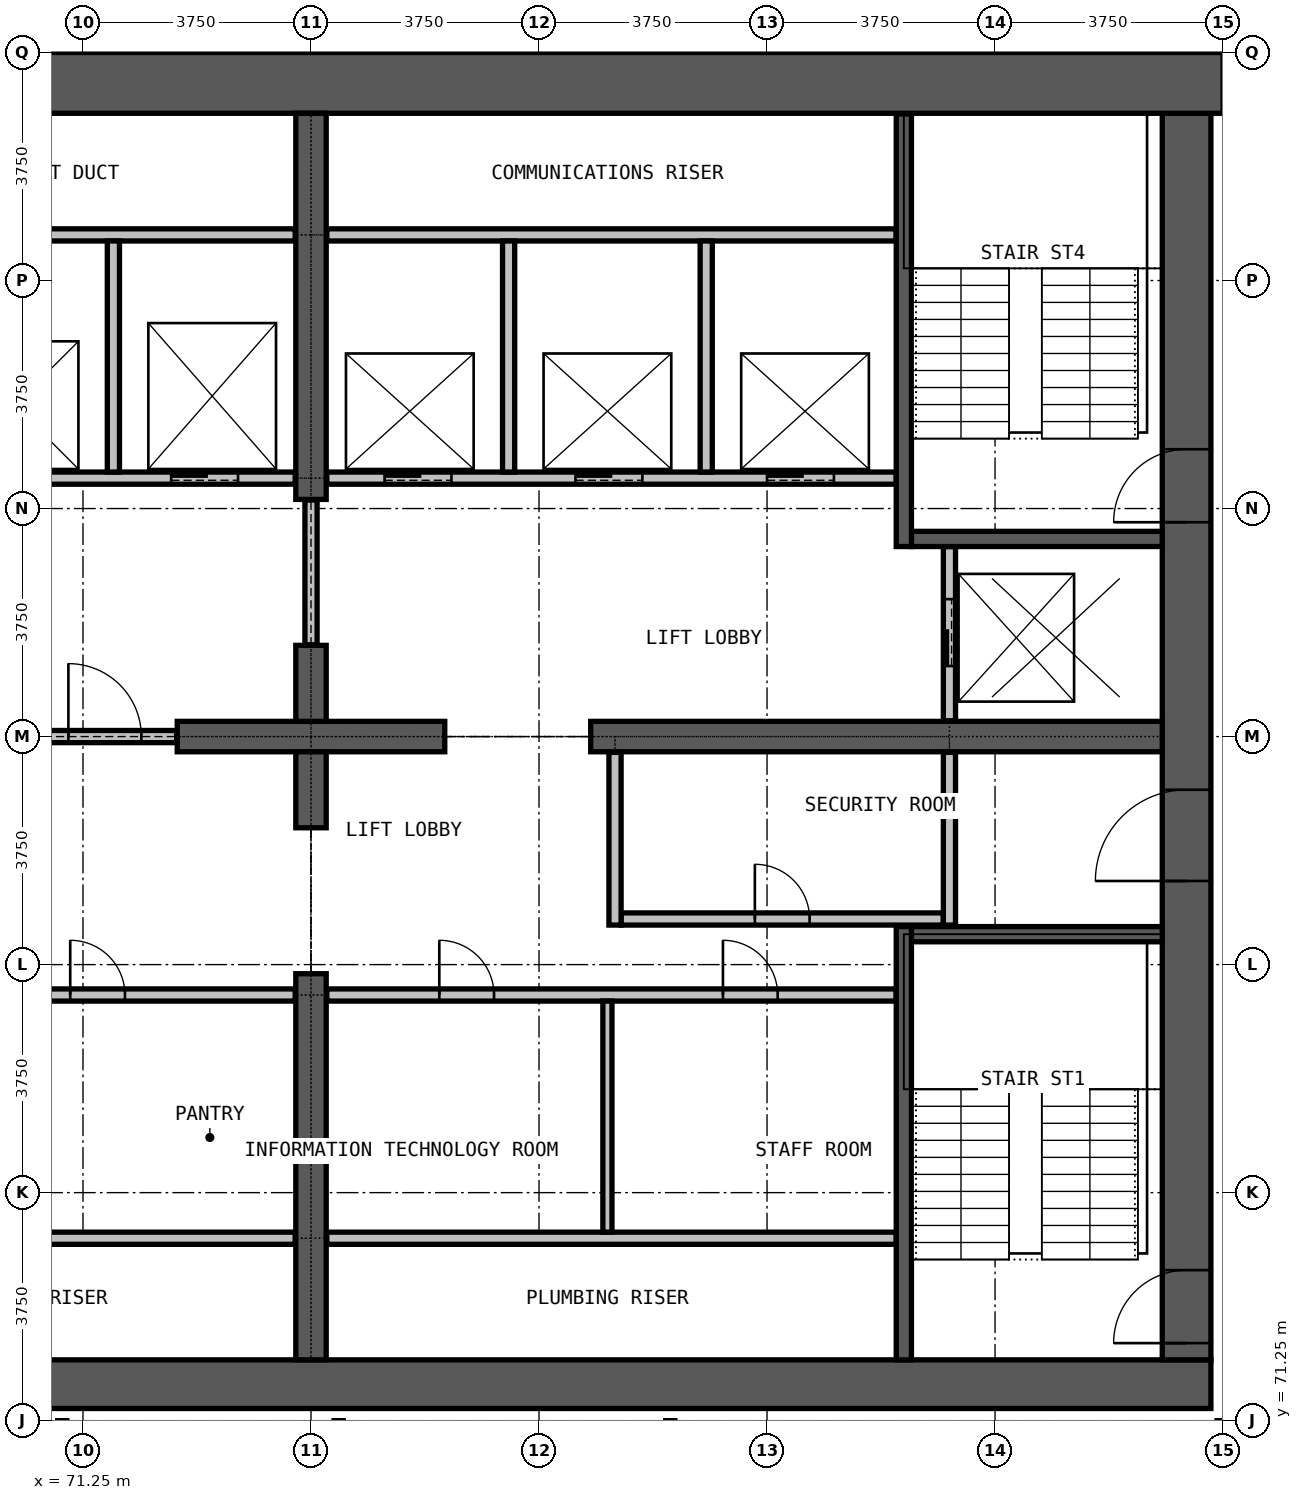
"""IFC4 building model, lengths in metres.
Left out: names, types, materials, properties, quantities, classifications, styles, units other than length and angle.
Written with IfcOpenShell. Run it as: python <this file> out.ifc"""

import sys

from ifc_helpers import new_model, si_unit, direction, frame, frame_2d, origin, place, context, subcontext, project, spatial, rectangle, extrude, element, fill, save


model = new_model("IFC4")
c1 = context("Model", 3, precision=1e-05, world=origin(), true_north=direction((0.0, 1.0)))
c2 = subcontext(c1, "Body", "Model", "MODEL_VIEW")
j1 = project(units=[si_unit("LENGTHUNIT", "METRE"), si_unit("PLANEANGLEUNIT", "RADIAN")], contexts=[c1])
p1 = place(None, origin())
s1 = spatial("IfcSite", under=j1, at=p1, CompositionType="ELEMENT")
p2 = place(p1, origin())
s2 = spatial("IfcBuilding", under=s1, at=p2, CompositionType="ELEMENT")
p3 = place(p2, frame((0.0, 0.0, 176.5)))
s3 = spatial("IfcBuildingStorey", under=s2, at=p3, CompositionType="ELEMENT", Elevation=176.5)
p4 = place(p3, frame((60.2, 71.85, 0.0), z_axis=(0.0, 0.0, 1.0), x_axis=(1.0, 0.0, 0.0)))
e1 = element("IfcWall", 1, at=p4, inside=s3, PredefinedType="SHEAR", context=c2, shape_type="SweptSolid", body=[
    extrude(rectangle(XDim=29.6, YDim=0.8, at=frame_2d((14.8, 0.0))), origin(), (0.0, 0.0, 1.0), 3.6),
])
p5 = place(p3, frame((89.4, 72.25, 0.0), z_axis=(0.0, 0.0, 1.0), x_axis=(0.0, 1.0, 0.0)))
e2 = element("IfcWall", 2, at=p5, inside=s3, PredefinedType="SHEAR", context=c2, shape_type="SweptSolid", body=[
    extrude(rectangle(XDim=20.5, YDim=0.8, at=frame_2d((10.25, 0.0))), origin(), (0.0, 0.0, 1.0), 3.6),
])
p6 = place(p5, frame((0.275, 0.0, 0.0)))
e3 = element("IfcOpeningElement", 3, at=p6, cuts=e2, PredefinedType="OPENING", context=c2, shape_type="SweptSolid", body=[
    extrude(rectangle(XDim=1.2, YDim=2.2, at=frame_2d((0.6, 1.1))), frame((0.0, 0.41, 0.0), z_axis=(0.0, -1.0, 0.0), x_axis=(1.0, 0.0, 0.0)), (0.0, 0.0, 1.0), 0.82),
])
p7 = place(p5, frame((13.775, 0.0, 0.0)))
e4 = element("IfcOpeningElement", 4, at=p7, cuts=e2, PredefinedType="OPENING", context=c2, shape_type="SweptSolid", body=[
    extrude(rectangle(XDim=1.2, YDim=2.2, at=frame_2d((0.6, 1.1))), frame((0.0, 0.41, 0.0), z_axis=(0.0, -1.0, 0.0), x_axis=(1.0, 0.0, 0.0)), (0.0, 0.0, 1.0), 0.82),
])
p8 = place(p5, frame((7.875, 0.0, 0.0)))
e5 = element("IfcOpeningElement", 5, at=p8, cuts=e2, PredefinedType="OPENING", context=c2, shape_type="SweptSolid", body=[
    extrude(rectangle(XDim=1.5, YDim=2.2, at=frame_2d((0.75, 1.1))), frame((0.0, 0.41, 0.0), z_axis=(0.0, -1.0, 0.0), x_axis=(1.0, 0.0, 0.0)), (0.0, 0.0, 1.0), 0.82),
])
p9 = place(p3, frame((90.0, 93.25, 0.0), z_axis=(0.0, 0.0, 1.0), x_axis=(-1.0, 0.0, 0.0)))
e6 = element("IfcWall", 6, at=p9, inside=s3, PredefinedType="SHEAR", context=c2, shape_type="SweptSolid", body=[
    extrude(rectangle(XDim=30.0, YDim=1.0, at=frame_2d((15.0, 0.0))), origin(), (0.0, 0.0, 1.0), 3.6),
])
p10 = place(p3, frame((72.8, 82.5, 0.0), z_axis=(0.0, 0.0, 1.0), x_axis=(1.0, 0.0, 0.0)))
e7 = element("IfcWall", 7, at=p10, inside=s3, PredefinedType="SHEAR", context=c2, shape_type="SweptSolid", body=[
    extrude(rectangle(XDim=4.4, YDim=0.5, at=frame_2d((2.2, 0.0))), origin(), (0.0, 0.0, 1.0), 3.6),
])
p11 = place(p3, frame((79.6, 82.5, 0.0), z_axis=(0.0, 0.0, 1.0), x_axis=(1.0, 0.0, 0.0)))
e8 = element("IfcWall", 8, at=p11, inside=s3, PredefinedType="SHEAR", context=c2, shape_type="SweptSolid", body=[
    extrude(rectangle(XDim=9.4, YDim=0.5, at=frame_2d((4.7, 0.0))), origin(), (0.0, 0.0, 1.0), 3.6),
])
p12 = place(p3, frame((75.0, 72.25, 0.0), z_axis=(0.0, 0.0, 1.0), x_axis=(0.0, 1.0, 0.0)))
e9 = element("IfcWall", 9, at=p12, inside=s3, PredefinedType="SHEAR", context=c2, shape_type="SweptSolid", body=[
    extrude(rectangle(XDim=6.35, YDim=0.5, at=frame_2d((3.175, 0.0))), origin(), (0.0, 0.0, 1.0), 3.6),
])
for number, where, z_axis, x_axis in (
    (10, (75.0, 81.0, 0.0), (0.0, 0.0, 1.0), (0.0, 1.0, 0.0)),
    (11, (75.0, 82.75, 0.0), (0.0, 0.0, 1.0), (0.0, 1.0, 0.0)),
):
    element("IfcWall", number, at=place(p3, frame(where, z_axis=z_axis, x_axis=x_axis)), inside=s3, PredefinedType="SHEAR", context=c2, shape_type="SweptSolid", body=[
        extrude(rectangle(XDim=1.25, YDim=0.5, at=frame_2d((0.625, 0.0))), origin(), (0.0, 0.0, 1.0), 3.6),
    ])
p13 = place(p3, frame((75.0, 86.4, 0.0), z_axis=(0.0, 0.0, 1.0), x_axis=(0.0, 1.0, 0.0)))
e12 = element("IfcWall", 12, at=p13, inside=s3, PredefinedType="SHEAR", context=c2, shape_type="SweptSolid", body=[
    extrude(rectangle(XDim=6.35, YDim=0.5, at=frame_2d((3.175, 0.0))), origin(), (0.0, 0.0, 1.0), 3.6),
])
for number, where, z_axis, x_axis in (
    (13, (65.375, 74.25, 0.0), (0.0, 0.0, 1.0), (1.0, 0.0, 0.0)),
    (14, (75.26, 74.25, 0.0), (0.0, 0.0, 1.0), (1.0, 0.0, 0.0)),
):
    element("IfcWall", number, at=place(p3, frame(where, z_axis=z_axis, x_axis=x_axis)), inside=s3, PredefinedType="PARTITIONING", context=c2, shape_type="SweptSolid", body=[
        extrude(rectangle(XDim=9.365, YDim=0.2, at=frame_2d((4.683, 0.0))), origin(), (0.0, 0.0, 1.0), 3.3),
    ])
p14 = place(p3, frame((65.375, 78.25, 0.0), z_axis=(0.0, 0.0, 1.0), x_axis=(1.0, 0.0, 0.0)))
e15 = element("IfcWall", 15, at=p14, inside=s3, PredefinedType="PARTITIONING", context=c2, shape_type="SweptSolid", body=[
    extrude(rectangle(XDim=9.365, YDim=0.2, at=frame_2d((4.683, 0.0))), origin(), (0.0, 0.0, 1.0), 3.3),
])
p15 = place(p14, frame((1.0, 0.0, 0.0)))
e16 = element("IfcOpeningElement", 16, at=p15, cuts=e15, PredefinedType="OPENING", context=c2, shape_type="SweptSolid", body=[
    extrude(rectangle(XDim=0.9, YDim=2.2, at=frame_2d((0.45, 1.1))), frame((0.0, 0.11, 0.0), z_axis=(0.0, -1.0, 0.0), x_axis=(1.0, 0.0, 0.0)), (0.0, 0.0, 1.0), 0.22),
])
p16 = place(p14, frame((5.665, 0.0, 0.0)))
e17 = element("IfcOpeningElement", 17, at=p16, cuts=e15, PredefinedType="OPENING", context=c2, shape_type="SweptSolid", body=[
    extrude(rectangle(XDim=0.9, YDim=2.2, at=frame_2d((0.45, 1.1))), frame((0.0, 0.11, 0.0), z_axis=(0.0, -1.0, 0.0), x_axis=(1.0, 0.0, 0.0)), (0.0, 0.0, 1.0), 0.22),
])
p17 = place(p3, frame((75.26, 78.25, 0.0), z_axis=(0.0, 0.0, 1.0), x_axis=(1.0, 0.0, 0.0)))
e18 = element("IfcWall", 18, at=p17, inside=s3, PredefinedType="PARTITIONING", context=c2, shape_type="SweptSolid", body=[
    extrude(rectangle(XDim=9.365, YDim=0.2, at=frame_2d((4.683, 0.0))), origin(), (0.0, 0.0, 1.0), 3.3),
])
p18 = place(p17, frame((1.85, 0.0, 0.0)))
e19 = element("IfcOpeningElement", 19, at=p18, cuts=e18, PredefinedType="OPENING", context=c2, shape_type="SweptSolid", body=[
    extrude(rectangle(XDim=0.9, YDim=2.2, at=frame_2d((0.45, 1.1))), frame((0.0, 0.11, 0.0), z_axis=(0.0, -1.0, 0.0), x_axis=(1.0, 0.0, 0.0)), (0.0, 0.0, 1.0), 0.22),
])
p19 = place(p17, frame((6.515, 0.0, 0.0)))
e20 = element("IfcOpeningElement", 20, at=p19, cuts=e18, PredefinedType="OPENING", context=c2, shape_type="SweptSolid", body=[
    extrude(rectangle(XDim=0.9, YDim=2.2, at=frame_2d((0.45, 1.1))), frame((0.0, 0.11, 0.0), z_axis=(0.0, -1.0, 0.0), x_axis=(1.0, 0.0, 0.0)), (0.0, 0.0, 1.0), 0.22),
])
p20 = place(p3, frame((80.1, 79.5, 0.0), z_axis=(0.0, 0.0, 1.0), x_axis=(1.0, 0.0, 0.0)))
e21 = element("IfcWall", 21, at=p20, inside=s3, PredefinedType="PARTITIONING", context=c2, shape_type="SweptSolid", body=[
    extrude(rectangle(XDim=5.3, YDim=0.2, at=frame_2d((2.65, 0.0))), origin(), (0.0, 0.0, 1.0), 3.3),
])
p21 = place(p20, frame((2.2, 0.0, 0.0)))
e22 = element("IfcOpeningElement", 22, at=p21, cuts=e21, PredefinedType="OPENING", context=c2, shape_type="SweptSolid", body=[
    extrude(rectangle(XDim=0.9, YDim=2.2, at=frame_2d((0.45, 1.1))), frame((0.0, 0.11, 0.0), z_axis=(0.0, -1.0, 0.0), x_axis=(1.0, 0.0, 0.0)), (0.0, 0.0, 1.0), 0.22),
])
p22 = place(p3, frame((70.41, 82.5, 0.0), z_axis=(0.0, 0.0, 1.0), x_axis=(1.0, 0.0, 0.0)))
e23 = element("IfcWall", 23, at=p22, inside=s3, PredefinedType="PARTITIONING", context=c2, shape_type="SweptSolid", body=[
    extrude(rectangle(XDim=2.38, YDim=0.2, at=frame_2d((1.19, 0.0))), origin(), (0.0, 0.0, 1.0), 2.4),
])
p23 = place(p22, frame((0.6, 0.0, 0.0)))
e24 = element("IfcOpeningElement", 24, at=p23, cuts=e23, PredefinedType="OPENING", context=c2, shape_type="SweptSolid", body=[
    extrude(rectangle(XDim=1.2, YDim=2.2, at=frame_2d((0.6, 1.1))), frame((0.0, 0.11, 0.0), z_axis=(0.0, -1.0, 0.0), x_axis=(1.0, 0.0, 0.0)), (0.0, 0.0, 1.0), 0.22),
])
p24 = place(p3, frame((75.0, 84.01, 0.0), z_axis=(0.0, 0.0, 1.0), x_axis=(0.0, 1.0, 0.0)))
e25 = element("IfcWall", 25, at=p24, inside=s3, PredefinedType="PARTITIONING", context=c2, shape_type="SweptSolid", body=[
    extrude(rectangle(XDim=2.38, YDim=0.2, at=frame_2d((1.19, 0.0))), origin(), (0.0, 0.0, 1.0), 2.4),
])
for number, where, z_axis, x_axis in (
    (26, (80.0, 79.4, 0.0), (0.0, 0.0, 1.0), (0.0, 1.0, 0.0)),
    (27, (85.5, 79.4, 0.0), (0.0, 0.0, 1.0), (0.0, 1.0, 0.0)),
):
    element("IfcWall", number, at=place(p3, frame(where, z_axis=z_axis, x_axis=x_axis)), inside=s3, PredefinedType="PARTITIONING", context=c2, shape_type="SweptSolid", body=[
        extrude(rectangle(XDim=2.84, YDim=0.2, at=frame_2d((1.42, 0.0))), origin(), (0.0, 0.0, 1.0), 3.3),
    ])
p25 = place(p3, frame((79.875, 74.35, 0.0), z_axis=(0.0, 0.0, 1.0), x_axis=(0.0, 1.0, 0.0)))
e28 = element("IfcWall", 28, at=p25, inside=s3, PredefinedType="PARTITIONING", context=c2, shape_type="SweptSolid", body=[
    extrude(rectangle(XDim=3.8, YDim=0.15, at=frame_2d((1.9, 0.0))), origin(), (0.0, 0.0, 1.0), 3.3),
])
p26 = place(p3, frame((65.375, 86.75, 0.0), z_axis=(0.0, 0.0, 1.0), x_axis=(1.0, 0.0, 0.0)))
e29 = element("IfcWall", 29, at=p26, inside=s3, PredefinedType="PARTITIONING", context=c2, shape_type="SweptSolid", body=[
    extrude(rectangle(XDim=9.365, YDim=0.2, at=frame_2d((4.683, 0.0))), origin(), (0.0, 0.0, 1.0), 3.3),
])
p27 = place(p26, frame((1.0, 0.0, 0.0)))
e30 = element("IfcOpeningElement", 30, at=p27, cuts=e29, PredefinedType="OPENING", context=c2, shape_type="SweptSolid", body=[
    extrude(rectangle(XDim=1.1, YDim=2.2, at=frame_2d((0.55, 1.1))), frame((0.0, 0.11, 0.0), z_axis=(0.0, -1.0, 0.0), x_axis=(1.0, 0.0, 0.0)), (0.0, 0.0, 1.0), 0.22),
])
p28 = place(p26, frame((4.175, 0.0, 0.0)))
e31 = element("IfcOpeningElement", 31, at=p28, cuts=e29, PredefinedType="OPENING", context=c2, shape_type="SweptSolid", body=[
    extrude(rectangle(XDim=1.1, YDim=2.2, at=frame_2d((0.55, 1.1))), frame((0.0, 0.11, 0.0), z_axis=(0.0, -1.0, 0.0), x_axis=(1.0, 0.0, 0.0)), (0.0, 0.0, 1.0), 0.22),
])
p29 = place(p26, frame((7.325, 0.0, 0.0)))
e32 = element("IfcOpeningElement", 32, at=p29, cuts=e29, PredefinedType="OPENING", context=c2, shape_type="SweptSolid", body=[
    extrude(rectangle(XDim=1.1, YDim=2.2, at=frame_2d((0.55, 1.1))), frame((0.0, 0.11, 0.0), z_axis=(0.0, -1.0, 0.0), x_axis=(1.0, 0.0, 0.0)), (0.0, 0.0, 1.0), 0.22),
])
p30 = place(p3, frame((75.26, 86.75, 0.0), z_axis=(0.0, 0.0, 1.0), x_axis=(1.0, 0.0, 0.0)))
e33 = element("IfcWall", 33, at=p30, inside=s3, PredefinedType="PARTITIONING", context=c2, shape_type="SweptSolid", body=[
    extrude(rectangle(XDim=9.365, YDim=0.2, at=frame_2d((4.683, 0.0))), origin(), (0.0, 0.0, 1.0), 3.3),
])
p31 = place(p30, frame((0.95, 0.0, 0.0)))
e34 = element("IfcOpeningElement", 34, at=p31, cuts=e33, PredefinedType="OPENING", context=c2, shape_type="SweptSolid", body=[
    extrude(rectangle(XDim=1.1, YDim=2.2, at=frame_2d((0.55, 1.1))), frame((0.0, 0.11, 0.0), z_axis=(0.0, -1.0, 0.0), x_axis=(1.0, 0.0, 0.0)), (0.0, 0.0, 1.0), 0.22),
])
p32 = place(p30, frame((4.09, 0.0, 0.0)))
e35 = element("IfcOpeningElement", 35, at=p32, cuts=e33, PredefinedType="OPENING", context=c2, shape_type="SweptSolid", body=[
    extrude(rectangle(XDim=1.1, YDim=2.2, at=frame_2d((0.55, 1.1))), frame((0.0, 0.11, 0.0), z_axis=(0.0, -1.0, 0.0), x_axis=(1.0, 0.0, 0.0)), (0.0, 0.0, 1.0), 0.22),
])
p33 = place(p30, frame((7.24, 0.0, 0.0)))
e36 = element("IfcOpeningElement", 36, at=p33, cuts=e33, PredefinedType="OPENING", context=c2, shape_type="SweptSolid", body=[
    extrude(rectangle(XDim=1.1, YDim=2.2, at=frame_2d((0.55, 1.1))), frame((0.0, 0.11, 0.0), z_axis=(0.0, -1.0, 0.0), x_axis=(1.0, 0.0, 0.0)), (0.0, 0.0, 1.0), 0.22),
])
for number, where, z_axis, x_axis in (
    (37, (65.375, 90.75, 0.0), (0.0, 0.0, 1.0), (1.0, 0.0, 0.0)),
    (38, (75.26, 90.75, 0.0), (0.0, 0.0, 1.0), (1.0, 0.0, 0.0)),
):
    element("IfcWall", number, at=place(p3, frame(where, z_axis=z_axis, x_axis=x_axis)), inside=s3, PredefinedType="PARTITIONING", context=c2, shape_type="SweptSolid", body=[
        extrude(rectangle(XDim=9.365, YDim=0.2, at=frame_2d((4.683, 0.0))), origin(), (0.0, 0.0, 1.0), 3.3),
    ])
for number, where, z_axis, x_axis in (
    (39, (71.75, 86.85, 0.0), (0.0, 0.0, 1.0), (0.0, 1.0, 0.0)),
    (40, (78.25, 86.85, 0.0), (0.0, 0.0, 1.0), (0.0, 1.0, 0.0)),
    (41, (81.5, 86.85, 0.0), (0.0, 0.0, 1.0), (0.0, 1.0, 0.0)),
):
    element("IfcWall", number, at=place(p3, frame(where, z_axis=z_axis, x_axis=x_axis)), inside=s3, PredefinedType="PARTITIONING", context=c2, shape_type="SweptSolid", body=[
        extrude(rectangle(XDim=3.8, YDim=0.2, at=frame_2d((1.9, 0.0))), origin(), (0.0, 0.0, 1.0), 3.3),
    ])
p34 = place(p3, frame((85.5, 82.76, 0.0), z_axis=(0.0, 0.0, 1.0), x_axis=(0.0, 1.0, 0.0)))
e42 = element("IfcWall", 42, at=p34, inside=s3, PredefinedType="PARTITIONING", context=c2, shape_type="SweptSolid", body=[
    extrude(rectangle(XDim=2.865, YDim=0.2, at=frame_2d((1.433, 0.0))), origin(), (0.0, 0.0, 1.0), 3.3),
])
p35 = place(p34, frame((0.9, 0.0, 0.0)))
e43 = element("IfcOpeningElement", 43, at=p35, cuts=e42, PredefinedType="OPENING", context=c2, shape_type="SweptSolid", body=[
    extrude(rectangle(XDim=1.1, YDim=2.2, at=frame_2d((0.55, 1.1))), frame((0.0, 0.11, 0.0), z_axis=(0.0, -1.0, 0.0), x_axis=(1.0, 0.0, 0.0)), (0.0, 0.0, 1.0), 0.22),
])
for number, where, z_axis, x_axis in (
    (44, (84.875, 79.25, 0.0), (0.0, 0.0, 1.0), (1.0, 0.0, 0.0)),
    (45, (84.875, 85.75, 0.0), (0.0, 0.0, 1.0), (1.0, 0.0, 0.0)),
):
    element("IfcWall", number, at=place(p3, frame(where, z_axis=z_axis, x_axis=x_axis)), inside=s3, PredefinedType="PARTITIONING", context=c2, shape_type="SweptSolid", body=[
        extrude(rectangle(XDim=4.125, YDim=0.25, at=frame_2d((2.062, 0.0))), origin(), (0.0, 0.0, 1.0), 3.3),
    ])
p36 = place(p3, frame((84.75, 72.25, 0.0), z_axis=(0.0, 0.0, 1.0), x_axis=(0.0, 1.0, 0.0)))
e46 = element("IfcWall", 46, at=p36, inside=s3, PredefinedType="PARTITIONING", context=c2, shape_type="SweptSolid", body=[
    extrude(rectangle(XDim=7.125, YDim=0.25, at=frame_2d((3.562, 0.0))), origin(), (0.0, 0.0, 1.0), 3.3),
])
p37 = place(p3, frame((84.75, 85.625, 0.0), z_axis=(0.0, 0.0, 1.0), x_axis=(0.0, 1.0, 0.0)))
e47 = element("IfcWall", 47, at=p37, inside=s3, PredefinedType="PARTITIONING", context=c2, shape_type="SweptSolid", body=[
    extrude(rectangle(XDim=7.115, YDim=0.25, at=frame_2d((3.558, 0.0))), origin(), (0.0, 0.0, 1.0), 3.3),
])
p38 = place(p31, origin())
e48 = element("IfcDoor", 48, at=p38, inside=s3, OperationType="DOUBLE_DOOR_SLIDING", PredefinedType="DOOR", context=c2, shape_type="SweptSolid", body=[
    extrude(rectangle(XDim=1.1, YDim=2.2, at=frame_2d((0.55, 1.1))), frame((0.0, 0.025, 0.0), z_axis=(0.0, -1.0, 0.0), x_axis=(1.0, 0.0, 0.0)), (0.0, 0.0, 1.0), 0.05),
])
fill(e34, e48)
p39 = place(p32, origin())
e49 = element("IfcDoor", 49, at=p39, inside=s3, OperationType="DOUBLE_DOOR_SLIDING", PredefinedType="DOOR", context=c2, shape_type="SweptSolid", body=[
    extrude(rectangle(XDim=1.1, YDim=2.2, at=frame_2d((0.55, 1.1))), frame((0.0, 0.025, 0.0), z_axis=(0.0, -1.0, 0.0), x_axis=(1.0, 0.0, 0.0)), (0.0, 0.0, 1.0), 0.05),
])
fill(e35, e49)
p40 = place(p33, origin())
e50 = element("IfcDoor", 50, at=p40, inside=s3, OperationType="DOUBLE_DOOR_SLIDING", PredefinedType="DOOR", context=c2, shape_type="SweptSolid", body=[
    extrude(rectangle(XDim=1.1, YDim=2.2, at=frame_2d((0.55, 1.1))), frame((0.0, 0.025, 0.0), z_axis=(0.0, -1.0, 0.0), x_axis=(1.0, 0.0, 0.0)), (0.0, 0.0, 1.0), 0.05),
])
fill(e36, e50)
p41 = place(p29, origin())
e51 = element("IfcDoor", 51, at=p41, inside=s3, OperationType="DOUBLE_DOOR_SLIDING", PredefinedType="DOOR", context=c2, shape_type="SweptSolid", body=[
    extrude(rectangle(XDim=1.1, YDim=2.2, at=frame_2d((0.55, 1.1))), frame((0.0, 0.025, 0.0), z_axis=(0.0, -1.0, 0.0), x_axis=(1.0, 0.0, 0.0)), (0.0, 0.0, 1.0), 0.05),
])
fill(e32, e51)
p42 = place(p35, origin())
e52 = element("IfcDoor", 52, at=p42, inside=s3, OperationType="DOUBLE_DOOR_SLIDING", PredefinedType="DOOR", context=c2, shape_type="SweptSolid", body=[
    extrude(rectangle(XDim=1.1, YDim=2.2, at=frame_2d((0.55, 1.1))), frame((0.0, 0.025, 0.0), z_axis=(0.0, -1.0, 0.0), x_axis=(1.0, 0.0, 0.0)), (0.0, 0.0, 1.0), 0.05),
])
fill(e43, e52)
p43 = place(p23, origin())
e53 = element("IfcDoor", 53, at=p43, inside=s3, OperationType="SINGLE_SWING_LEFT", PredefinedType="DOOR", context=c2, shape_type="SweptSolid", body=[
    extrude(rectangle(XDim=1.2, YDim=2.2, at=frame_2d((0.6, 1.1))), frame((0.0, 0.025, 0.0), z_axis=(0.0, -1.0, 0.0), x_axis=(1.0, 0.0, 0.0)), (0.0, 0.0, 1.0), 0.05),
])
fill(e24, e53)
p44 = place(p6, origin())
e54 = element("IfcDoor", 54, at=p44, inside=s3, OperationType="SINGLE_SWING_LEFT", PredefinedType="DOOR", context=c2, shape_type="SweptSolid", body=[
    extrude(rectangle(XDim=1.2, YDim=2.2, at=frame_2d((0.6, 1.1))), frame((0.0, 0.025, 0.0), z_axis=(0.0, -1.0, 0.0), x_axis=(1.0, 0.0, 0.0)), (0.0, 0.0, 1.0), 0.05),
])
fill(e3, e54)
p45 = place(p7, origin())
e55 = element("IfcDoor", 55, at=p45, inside=s3, OperationType="SINGLE_SWING_LEFT", PredefinedType="DOOR", context=c2, shape_type="SweptSolid", body=[
    extrude(rectangle(XDim=1.2, YDim=2.2, at=frame_2d((0.6, 1.1))), frame((0.0, 0.025, 0.0), z_axis=(0.0, -1.0, 0.0), x_axis=(1.0, 0.0, 0.0)), (0.0, 0.0, 1.0), 0.05),
])
fill(e4, e55)
p46 = place(p8, origin())
e56 = element("IfcDoor", 56, at=p46, inside=s3, OperationType="DOUBLE_DOOR_SINGLE_SWING", PredefinedType="DOOR", context=c2, shape_type="SweptSolid", body=[
    extrude(rectangle(XDim=1.5, YDim=2.2, at=frame_2d((0.75, 1.1))), frame((0.0, 0.025, 0.0), z_axis=(0.0, -1.0, 0.0), x_axis=(1.0, 0.0, 0.0)), (0.0, 0.0, 1.0), 0.05),
])
fill(e5, e56)
p47 = place(p21, origin())
e57 = element("IfcDoor", 57, at=p47, inside=s3, OperationType="SINGLE_SWING_LEFT", PredefinedType="DOOR", context=c2, shape_type="SweptSolid", body=[
    extrude(rectangle(XDim=0.9, YDim=2.2, at=frame_2d((0.45, 1.1))), frame((0.0, 0.025, 0.0), z_axis=(0.0, -1.0, 0.0), x_axis=(1.0, 0.0, 0.0)), (0.0, 0.0, 1.0), 0.05),
])
fill(e22, e57)
p48 = place(p16, origin())
e58 = element("IfcDoor", 58, at=p48, inside=s3, OperationType="SINGLE_SWING_RIGHT", PredefinedType="DOOR", context=c2, shape_type="SweptSolid", body=[
    extrude(rectangle(XDim=0.9, YDim=2.2, at=frame_2d((0.45, 1.1))), frame((0.0, 0.025, 0.0), z_axis=(0.0, -1.0, 0.0), x_axis=(1.0, 0.0, 0.0)), (0.0, 0.0, 1.0), 0.05),
])
fill(e17, e58)
p49 = place(p18, origin())
e59 = element("IfcDoor", 59, at=p49, inside=s3, OperationType="SINGLE_SWING_LEFT", PredefinedType="DOOR", context=c2, shape_type="SweptSolid", body=[
    extrude(rectangle(XDim=0.9, YDim=2.2, at=frame_2d((0.45, 1.1))), frame((0.0, 0.025, 0.0), z_axis=(0.0, -1.0, 0.0), x_axis=(1.0, 0.0, 0.0)), (0.0, 0.0, 1.0), 0.05),
])
fill(e19, e59)
p50 = place(p19, origin())
e60 = element("IfcDoor", 60, at=p50, inside=s3, OperationType="SINGLE_SWING_LEFT", PredefinedType="DOOR", context=c2, shape_type="SweptSolid", body=[
    extrude(rectangle(XDim=0.9, YDim=2.2, at=frame_2d((0.45, 1.1))), frame((0.0, 0.025, 0.0), z_axis=(0.0, -1.0, 0.0), x_axis=(1.0, 0.0, 0.0)), (0.0, 0.0, 1.0), 0.05),
])
fill(e20, e60)
save(model, sys.argv[1])
